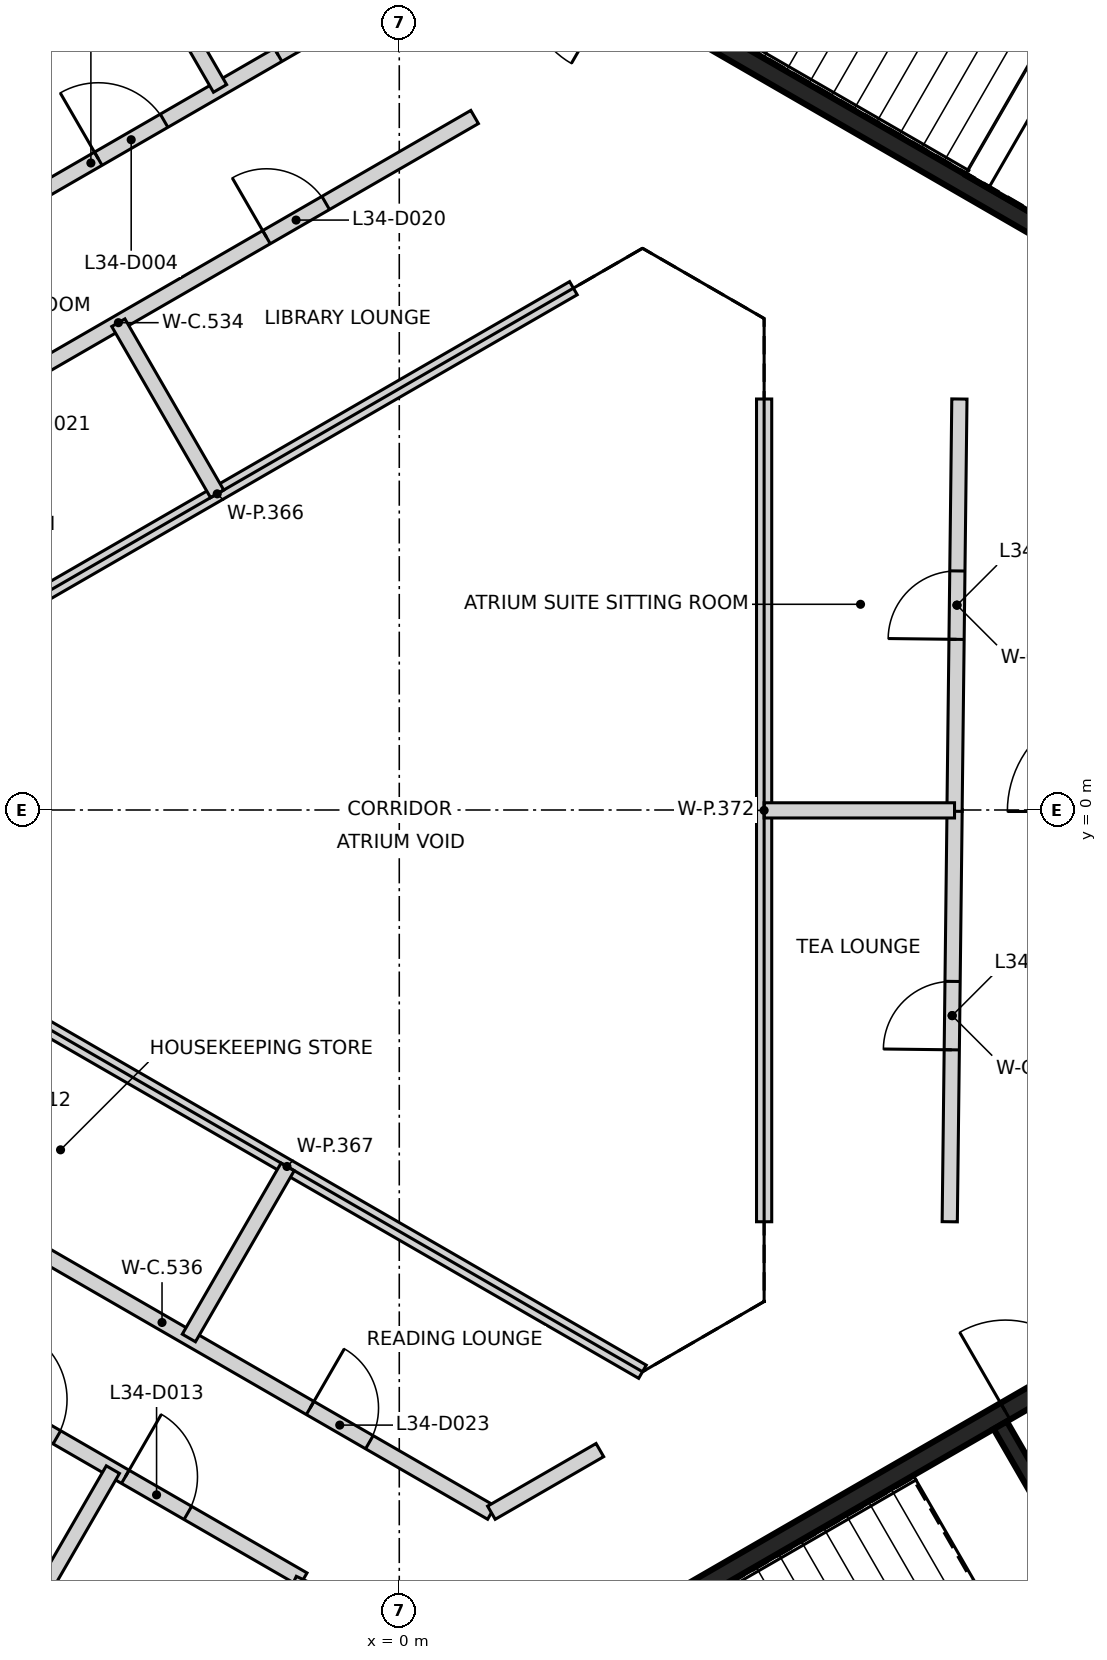
"""IFC4 building model, lengths in metres.
Left out: names, types, materials, properties, quantities, classifications, styles, units other than length and angle.
Written with IfcOpenShell. Run it as: python <this file> out.ifc"""

import sys

from ifc_helpers import new_model, si_unit, direction, frame, frame_2d, origin, place, context, subcontext, project, spatial, rectangle, extrude, element, fill, save


model = new_model("IFC4")
c1 = context("Model", 3, precision=1e-05, world=origin(), true_north=direction((0.0, 1.0)))
c2 = subcontext(c1, "Body", "Model", "MODEL_VIEW")
j1 = project(units=[si_unit("LENGTHUNIT", "METRE"), si_unit("PLANEANGLEUNIT", "RADIAN")], contexts=[c1])
p1 = place(None, origin())
s1 = spatial("IfcSite", under=j1, at=p1, CompositionType="ELEMENT")
p2 = place(p1, origin())
s2 = spatial("IfcBuilding", under=s1, at=p2, CompositionType="ELEMENT")
p3 = place(p2, frame((0.0, 0.0, 139.6)))
s3 = spatial("IfcBuildingStorey", under=s2, at=p3, CompositionType="ELEMENT", Elevation=139.6)
p4 = place(p3, frame((10.42, 6.498, 0.0), z_axis=(0.0, 0.0, 1.0), x_axis=(-0.866021906294, 0.500006057782, 0.0)))
e1 = element("IfcWall", 1, at=p4, inside=s3, PredefinedType="SHEAR", context=c2, shape_type="SweptSolid", body=[
    extrude(rectangle(XDim=11.55, YDim=0.25, at=frame_2d((5.775, 0.0))), origin(), (0.0, 0.0, 1.0), 3.2),
])
p5 = place(p4, frame((10.025, 0.0, 0.0)))
e2 = element("IfcOpeningElement", 2, at=p5, cuts=e1, PredefinedType="OPENING", context=c2, shape_type="SweptSolid", body=[
    extrude(rectangle(XDim=1.2, YDim=2.1, at=frame_2d((0.6, 1.05))), frame((0.0, 0.135, 0.0), z_axis=(0.0, -1.0, 0.0), x_axis=(1.0, 0.0, 0.0)), (0.0, 0.0, 1.0), 0.27),
])
p6 = place(p4, frame((8.725, 0.0, 0.0)))
e3 = element("IfcOpeningElement", 3, at=p6, cuts=e1, PredefinedType="OPENING", context=c2, shape_type="SweptSolid", body=[
    extrude(rectangle(XDim=1.2, YDim=2.1, at=frame_2d((0.6, 1.05))), frame((0.0, 0.135, 0.0), z_axis=(0.0, -1.0, 0.0), x_axis=(1.0, 0.0, 0.0)), (0.0, 0.0, 1.0), 0.27),
])
p7 = place(p3, frame((0.417, -12.273, 0.0), z_axis=(0.0, 0.0, 1.0), x_axis=(0.866021906294, 0.500006057782, 0.0)))
e4 = element("IfcWall", 4, at=p7, inside=s3, PredefinedType="SHEAR", context=c2, shape_type="SweptSolid", body=[
    extrude(rectangle(XDim=11.55, YDim=0.25, at=frame_2d((5.775, 0.0))), origin(), (0.0, 0.0, 1.0), 3.2),
])
p8 = place(p7, frame((10.025, 0.0, 0.0)))
e5 = element("IfcOpeningElement", 5, at=p8, cuts=e4, PredefinedType="OPENING", context=c2, shape_type="SweptSolid", body=[
    extrude(rectangle(XDim=1.2, YDim=2.1, at=frame_2d((0.6, 1.05))), frame((0.0, 0.135, 0.0), z_axis=(0.0, -1.0, 0.0), x_axis=(1.0, 0.0, 0.0)), (0.0, 0.0, 1.0), 0.27),
])
p9 = place(p7, frame((8.725, 0.0, 0.0)))
e6 = element("IfcOpeningElement", 6, at=p9, cuts=e4, PredefinedType="OPENING", context=c2, shape_type="SweptSolid", body=[
    extrude(rectangle(XDim=1.2, YDim=2.1, at=frame_2d((0.6, 1.05))), frame((0.0, 0.135, 0.0), z_axis=(0.0, -1.0, 0.0), x_axis=(1.0, 0.0, 0.0)), (0.0, 0.0, 1.0), 0.27),
])
p10 = place(p3, frame((7.906, -8.094, 0.0), z_axis=(0.0, 0.0, 1.0), x_axis=(0.500024287448, -0.866011380966, 0.0)))
e7 = element("IfcWall", 7, at=p10, inside=s3, PredefinedType="SHEAR", context=c2, shape_type="SweptSolid", body=[
    extrude(rectangle(XDim=5.251, YDim=0.2, at=frame_2d((2.625, 0.0))), origin(), (0.0, 0.0, 1.0), 3.2),
])
p11 = place(p10, frame((1.849, 0.0, 0.0)))
e8 = element("IfcOpeningElement", 8, at=p11, cuts=e7, PredefinedType="OPENING", context=c2, shape_type="SweptSolid", body=[
    extrude(rectangle(XDim=1.4, YDim=2.1, at=frame_2d((0.7, 1.05))), frame((0.0, 0.11, 0.0), z_axis=(0.0, -1.0, 0.0), x_axis=(1.0, 0.0, 0.0)), (0.0, 0.0, 1.0), 0.22),
])
p12 = place(p3, frame((-9.447, -5.4, 0.0), z_axis=(0.0, 0.0, 1.0), x_axis=(0.866101262146, -0.49986858644, 0.0)))
e9 = element("IfcWall", 9, at=p12, inside=s3, PredefinedType="PARTITIONING", context=c2, shape_type="SweptSolid", body=[
    extrude(rectangle(XDim=9.449, YDim=0.2, at=frame_2d((4.724, 0.0))), origin(), (0.0, 0.0, 1.0), 3.2),
])
p13 = place(p12, frame((2.718, 0.0, 0.0)))
e10 = element("IfcOpeningElement", 10, at=p13, cuts=e9, PredefinedType="OPENING", context=c2, shape_type="SweptSolid", body=[
    extrude(rectangle(XDim=0.95, YDim=2.1, at=frame_2d((0.475, 1.05))), frame((0.0, 0.11, 0.0), z_axis=(0.0, -1.0, 0.0), x_axis=(1.0, 0.0, 0.0)), (0.0, 0.0, 1.0), 0.22),
])
p14 = place(p12, frame((4.707, 0.0, 0.0)))
e11 = element("IfcOpeningElement", 11, at=p14, cuts=e9, PredefinedType="OPENING", context=c2, shape_type="SweptSolid", body=[
    extrude(rectangle(XDim=1.0, YDim=2.1, at=frame_2d((0.5, 1.05))), frame((0.0, 0.11, 0.0), z_axis=(0.0, -1.0, 0.0), x_axis=(1.0, 0.0, 0.0)), (0.0, 0.0, 1.0), 0.22),
])
p15 = place(p12, frame((6.746, 0.0, 0.0)))
e12 = element("IfcOpeningElement", 12, at=p15, cuts=e9, PredefinedType="OPENING", context=c2, shape_type="SweptSolid", body=[
    extrude(rectangle(XDim=0.95, YDim=2.1, at=frame_2d((0.475, 1.05))), frame((0.0, 0.11, 0.0), z_axis=(0.0, -1.0, 0.0), x_axis=(1.0, 0.0, 0.0)), (0.0, 0.0, 1.0), 0.22),
])
p16 = place(p3, frame((-8.382, 3.705, 0.0), z_axis=(0.0, 0.0, 1.0), x_axis=(0.866012036978, 0.500023151273, 0.0)))
e13 = element("IfcWall", 13, at=p16, inside=s3, PredefinedType="PARTITIONING", context=c2, shape_type="SweptSolid", body=[
    extrude(rectangle(XDim=10.823, YDim=0.2, at=frame_2d((5.412, 0.0))), origin(), (0.0, 0.0, 1.0), 3.2),
])
p17 = place(p16, frame((7.661, 0.0, 0.0)))
e14 = element("IfcOpeningElement", 14, at=p17, cuts=e13, PredefinedType="OPENING", context=c2, shape_type="SweptSolid", body=[
    extrude(rectangle(XDim=0.9, YDim=2.1, at=frame_2d((0.45, 1.05))), frame((0.0, 0.11, 0.0), z_axis=(0.0, -1.0, 0.0), x_axis=(1.0, 0.0, 0.0)), (0.0, 0.0, 1.0), 0.22),
])
p18 = place(p16, frame((2.261, 0.0, 0.0)))
e15 = element("IfcOpeningElement", 15, at=p18, cuts=e13, PredefinedType="OPENING", context=c2, shape_type="SweptSolid", body=[
    extrude(rectangle(XDim=0.9, YDim=2.1, at=frame_2d((0.45, 1.05))), frame((0.0, 0.11, 0.0), z_axis=(0.0, -1.0, 0.0), x_axis=(1.0, 0.0, 0.0)), (0.0, 0.0, 1.0), 0.22),
])
p19 = place(p3, frame((-8.161, 6.142, 0.0), z_axis=(0.0, 0.0, 1.0), x_axis=(0.865927304867, 0.500169873828, 0.0)))
e16 = element("IfcWall", 16, at=p19, inside=s3, PredefinedType="PARTITIONING", context=c2, shape_type="SweptSolid", body=[
    extrude(rectangle(XDim=9.478, YDim=0.2, at=frame_2d((4.739, 0.0))), origin(), (0.0, 0.0, 1.0), 3.2),
])
p20 = place(p19, frame((4.851, 0.0, 0.0)))
e17 = element("IfcOpeningElement", 17, at=p20, cuts=e16, PredefinedType="OPENING", context=c2, shape_type="SweptSolid", body=[
    extrude(rectangle(XDim=1.0, YDim=2.1, at=frame_2d((0.5, 1.05))), frame((0.0, 0.11, 0.0), z_axis=(0.0, -1.0, 0.0), x_axis=(1.0, 0.0, 0.0)), (0.0, 0.0, 1.0), 0.22),
])
p21 = place(p19, frame((7.583, 0.0, 0.0)))
e18 = element("IfcOpeningElement", 18, at=p21, cuts=e16, PredefinedType="OPENING", context=c2, shape_type="SweptSolid", body=[
    extrude(rectangle(XDim=1.0, YDim=2.1, at=frame_2d((0.5, 1.05))), frame((0.0, 0.11, 0.0), z_axis=(0.0, -1.0, 0.0), x_axis=(1.0, 0.0, 0.0)), (0.0, 0.0, 1.0), 0.22),
])
p22 = place(p3, frame((-7.455, -4.24, 0.0), z_axis=(0.0, 0.0, 1.0), x_axis=(0.866015783746, -0.500016662025, 0.0)))
e19 = element("IfcWall", 19, at=p22, inside=s3, PredefinedType="PARTITIONING", context=c2, shape_type="SweptSolid", body=[
    extrude(rectangle(XDim=10.009, YDim=0.2, at=frame_2d((5.004, 0.0))), origin(), (0.0, 0.0, 1.0), 3.2),
])
p23 = place(p22, frame((2.262, 0.0, 0.0)))
e20 = element("IfcOpeningElement", 20, at=p23, cuts=e19, PredefinedType="OPENING", context=c2, shape_type="SweptSolid", body=[
    extrude(rectangle(XDim=0.9, YDim=2.1, at=frame_2d((0.45, 1.05))), frame((0.0, 0.11, 0.0), z_axis=(0.0, -1.0, 0.0), x_axis=(1.0, 0.0, 0.0)), (0.0, 0.0, 1.0), 0.22),
])
p24 = place(p22, frame((7.254, 0.0, 0.0)))
e21 = element("IfcOpeningElement", 21, at=p24, cuts=e19, PredefinedType="OPENING", context=c2, shape_type="SweptSolid", body=[
    extrude(rectangle(XDim=0.9, YDim=2.1, at=frame_2d((0.45, 1.05))), frame((0.0, 0.11, 0.0), z_axis=(0.0, -1.0, 0.0), x_axis=(1.0, 0.0, 0.0)), (0.0, 0.0, 1.0), 0.22),
])
p25 = place(p3, frame((-2.162, -12.041, 0.0), z_axis=(0.0, 0.0, 1.0), x_axis=(0.424280226728, 0.905530943264, 0.0)))
e22 = element("IfcWall", 22, at=p25, inside=s3, PredefinedType="PARTITIONING", context=c2, shape_type="SweptSolid", body=[
    extrude(rectangle(XDim=2.117, YDim=0.2, at=frame_2d((1.059, 0.0))), origin(), (0.0, 0.0, 1.0), 3.2),
])
p26 = place(p3, frame((1.212, -9.245, 0.0), z_axis=(0.0, 0.0, 1.0), x_axis=(0.86593636949, 0.500154180222, 0.0)))
e23 = element("IfcWall", 23, at=p26, inside=s3, PredefinedType="PARTITIONING", context=c2, shape_type="SweptSolid", body=[
    extrude(rectangle(XDim=1.648, YDim=0.2, at=frame_2d((0.824, 0.0))), origin(), (0.0, 0.0, 1.0), 3.2),
])
p27 = place(p3, frame((7.242, -5.417, 0.0), z_axis=(0.0, 0.0, 1.0), x_axis=(0.01179195138, 0.999930472524, 0.0)))
e24 = element("IfcWall", 24, at=p27, inside=s3, PredefinedType="PARTITIONING", context=c2, shape_type="SweptSolid", body=[
    extrude(rectangle(XDim=5.425, YDim=0.2, at=frame_2d((2.712, 0.0))), origin(), (0.0, 0.0, 1.0), 3.2),
])
p28 = place(p27, frame((2.262, 0.0, 0.0)))
e25 = element("IfcOpeningElement", 25, at=p28, cuts=e24, PredefinedType="OPENING", context=c2, shape_type="SweptSolid", body=[
    extrude(rectangle(XDim=0.9, YDim=2.1, at=frame_2d((0.45, 1.05))), frame((0.0, 0.11, 0.0), z_axis=(0.0, -1.0, 0.0), x_axis=(1.0, 0.0, 0.0)), (0.0, 0.0, 1.0), 0.22),
])
p29 = place(p3, frame((7.305, -0.017, 0.0), z_axis=(0.0, 0.0, 1.0), x_axis=(0.01179195138, 0.999930472524, 0.0)))
e26 = element("IfcWall", 26, at=p29, inside=s3, PredefinedType="PARTITIONING", context=c2, shape_type="SweptSolid", body=[
    extrude(rectangle(XDim=5.425, YDim=0.2, at=frame_2d((2.712, 0.0))), origin(), (0.0, 0.0, 1.0), 3.2),
])
p30 = place(p29, frame((2.262, 0.0, 0.0)))
e27 = element("IfcOpeningElement", 27, at=p30, cuts=e26, PredefinedType="OPENING", context=c2, shape_type="SweptSolid", body=[
    extrude(rectangle(XDim=0.9, YDim=2.1, at=frame_2d((0.45, 1.05))), frame((0.0, 0.11, 0.0), z_axis=(0.0, -1.0, 0.0), x_axis=(1.0, 0.0, 0.0)), (0.0, 0.0, 1.0), 0.22),
])
p31 = place(p3, frame((-9.882, -19.267, 0.0), z_axis=(0.0, 0.0, 1.0), x_axis=(0.499993811829, 0.866028976497, 0.0)))
e28 = element("IfcWall", 28, at=p31, inside=s3, PredefinedType="PARTITIONING", context=c2, shape_type="SweptSolid", body=[
    extrude(rectangle(XDim=12.227, YDim=0.2, at=frame_2d((6.114, 0.0))), origin(), (0.0, 0.0, 1.0), 2.3),
])
p32 = place(p3, frame((-8.468, 20.076, 0.0), z_axis=(0.0, 0.0, 1.0), x_axis=(0.499961688474, -0.866047521824, 0.0)))
e29 = element("IfcWall", 29, at=p32, inside=s3, PredefinedType="PARTITIONING", context=c2, shape_type="SweptSolid", body=[
    extrude(rectangle(XDim=12.22, YDim=0.2, at=frame_2d((6.11, 0.0))), origin(), (0.0, 0.0, 1.0), 2.3),
])
p33 = place(p3, frame((-7.082, 1.453, 0.0), z_axis=(0.0, 0.0, 1.0), x_axis=(0.866010525116, 0.500025769724, 0.0)))
e30 = element("IfcWall", 30, at=p33, inside=s3, PredefinedType="PARTITIONING", context=c2, shape_type="SweptSolid", body=[
    extrude(rectangle(XDim=10.823, YDim=0.2, at=frame_2d((5.411, 0.0))), origin(), (0.0, 0.0, 1.0), 2.3),
])
p34 = place(p3, frame((-6.155, -1.989, 0.0), z_axis=(0.0, 0.0, 1.0), x_axis=(0.866009062299, -0.500028303215, 0.0)))
e31 = element("IfcWall", 31, at=p34, inside=s3, PredefinedType="PARTITIONING", context=c2, shape_type="SweptSolid", body=[
    extrude(rectangle(XDim=10.802, YDim=0.2, at=frame_2d((5.401, 0.0))), origin(), (0.0, 0.0, 1.0), 2.3),
])
p35 = place(p3, frame((-3.696, 6.411, 0.0), z_axis=(0.0, 0.0, 1.0), x_axis=(0.500006934395, -0.866021400173, 0.0)))
e32 = element("IfcWall", 32, at=p35, inside=s3, PredefinedType="PARTITIONING", context=c2, shape_type="SweptSolid", body=[
    extrude(rectangle(XDim=2.6, YDim=0.2, at=frame_2d((1.3, 0.0))), origin(), (0.0, 0.0, 1.0), 2.3),
])
p36 = place(p3, frame((-2.768, -6.946, 0.0), z_axis=(0.0, 0.0, 1.0), x_axis=(0.500017832597, 0.866015107885, 0.0)))
e33 = element("IfcWall", 33, at=p36, inside=s3, PredefinedType="PARTITIONING", context=c2, shape_type="SweptSolid", body=[
    extrude(rectangle(XDim=2.6, YDim=0.2, at=frame_2d((1.3, 0.0))), origin(), (0.0, 0.0, 1.0), 2.3),
])
p37 = place(p3, frame((4.8, -5.417, 0.0), z_axis=(0.0, 0.0, 1.0), x_axis=(0.0, 1.0, 0.0)))
e34 = element("IfcWall", 34, at=p37, inside=s3, PredefinedType="PARTITIONING", context=c2, shape_type="SweptSolid", body=[
    extrude(rectangle(XDim=10.824, YDim=0.2, at=frame_2d((5.412, 0.0))), origin(), (0.0, 0.0, 1.0), 2.3),
])
p38 = place(p3, frame((4.8, -0.005, 0.0), z_axis=(0.0, 0.0, 1.0), x_axis=(1.0, 0.0, 0.0)))
e35 = element("IfcWall", 35, at=p38, inside=s3, PredefinedType="PARTITIONING", context=c2, shape_type="SweptSolid", body=[
    extrude(rectangle(XDim=2.505, YDim=0.2, at=frame_2d((1.252, 0.0))), origin(), (0.0, 0.0, 1.0), 2.3),
])
p39 = place(p9, origin())
e36 = element("IfcDoor", 36, at=p39, inside=s3, OperationType="SINGLE_SWING_RIGHT", PredefinedType="DOOR", context=c2, shape_type="SweptSolid", body=[
    extrude(rectangle(XDim=1.2, YDim=2.1, at=frame_2d((0.6, 1.05))), frame((0.0, 0.025, 0.0), z_axis=(0.0, -1.0, 0.0), x_axis=(1.0, 0.0, 0.0)), (0.0, 0.0, 1.0), 0.05),
])
fill(e6, e36)
p40 = place(p20, origin())
e37 = element("IfcDoor", 37, at=p40, inside=s3, OperationType="SINGLE_SWING_LEFT", PredefinedType="DOOR", context=c2, shape_type="SweptSolid", body=[
    extrude(rectangle(XDim=1.0, YDim=2.1, at=frame_2d((0.5, 1.05))), frame((0.0, 0.025, 0.0), z_axis=(0.0, -1.0, 0.0), x_axis=(1.0, 0.0, 0.0)), (0.0, 0.0, 1.0), 0.05),
])
fill(e17, e37)
p41 = place(p21, origin())
e38 = element("IfcDoor", 38, at=p41, inside=s3, OperationType="SINGLE_SWING_LEFT", PredefinedType="DOOR", context=c2, shape_type="SweptSolid", body=[
    extrude(rectangle(XDim=1.0, YDim=2.1, at=frame_2d((0.5, 1.05))), frame((0.0, 0.025, 0.0), z_axis=(0.0, -1.0, 0.0), x_axis=(1.0, 0.0, 0.0)), (0.0, 0.0, 1.0), 0.05),
])
fill(e18, e38)
p42 = place(p14, frame((1.0, 0.0, 0.0), z_axis=(0.0, 0.0, 1.0), x_axis=(-1.0, 0.0, 0.0)))
e39 = element("IfcDoor", 39, at=p42, inside=s3, OperationType="SINGLE_SWING_LEFT", PredefinedType="DOOR", context=c2, shape_type="SweptSolid", body=[
    extrude(rectangle(XDim=1.0, YDim=2.1, at=frame_2d((0.5, 1.05))), frame((0.0, 0.025, 0.0), z_axis=(0.0, -1.0, 0.0), x_axis=(1.0, 0.0, 0.0)), (0.0, 0.0, 1.0), 0.05),
])
fill(e11, e39)
p43 = place(p15, frame((0.95, 0.0, 0.0), z_axis=(0.0, 0.0, 1.0), x_axis=(-1.0, 0.0, 0.0)))
e40 = element("IfcDoor", 40, at=p43, inside=s3, OperationType="SINGLE_SWING_LEFT", PredefinedType="DOOR", context=c2, shape_type="SweptSolid", body=[
    extrude(rectangle(XDim=0.95, YDim=2.1, at=frame_2d((0.475, 1.05))), frame((0.0, 0.025, 0.0), z_axis=(0.0, -1.0, 0.0), x_axis=(1.0, 0.0, 0.0)), (0.0, 0.0, 1.0), 0.05),
])
fill(e12, e40)
p44 = place(p28, origin())
e41 = element("IfcDoor", 41, at=p44, inside=s3, OperationType="SINGLE_SWING_LEFT", PredefinedType="DOOR", context=c2, shape_type="SweptSolid", body=[
    extrude(rectangle(XDim=0.9, YDim=2.1, at=frame_2d((0.45, 1.05))), frame((0.0, 0.025, 0.0), z_axis=(0.0, -1.0, 0.0), x_axis=(1.0, 0.0, 0.0)), (0.0, 0.0, 1.0), 0.05),
])
fill(e25, e41)
p45 = place(p30, origin())
e42 = element("IfcDoor", 42, at=p45, inside=s3, OperationType="SINGLE_SWING_LEFT", PredefinedType="DOOR", context=c2, shape_type="SweptSolid", body=[
    extrude(rectangle(XDim=0.9, YDim=2.1, at=frame_2d((0.45, 1.05))), frame((0.0, 0.025, 0.0), z_axis=(0.0, -1.0, 0.0), x_axis=(1.0, 0.0, 0.0)), (0.0, 0.0, 1.0), 0.05),
])
fill(e27, e42)
p46 = place(p17, frame((0.9, 0.0, 0.0), z_axis=(0.0, 0.0, 1.0), x_axis=(-1.0, 0.0, 0.0)))
e43 = element("IfcDoor", 43, at=p46, inside=s3, OperationType="SINGLE_SWING_LEFT", PredefinedType="DOOR", context=c2, shape_type="SweptSolid", body=[
    extrude(rectangle(XDim=0.9, YDim=2.1, at=frame_2d((0.45, 1.05))), frame((0.0, 0.025, 0.0), z_axis=(0.0, -1.0, 0.0), x_axis=(1.0, 0.0, 0.0)), (0.0, 0.0, 1.0), 0.05),
])
fill(e14, e43)
p47 = place(p24, origin())
e44 = element("IfcDoor", 44, at=p47, inside=s3, OperationType="SINGLE_SWING_LEFT", PredefinedType="DOOR", context=c2, shape_type="SweptSolid", body=[
    extrude(rectangle(XDim=0.9, YDim=2.1, at=frame_2d((0.45, 1.05))), frame((0.0, 0.025, 0.0), z_axis=(0.0, -1.0, 0.0), x_axis=(1.0, 0.0, 0.0)), (0.0, 0.0, 1.0), 0.05),
])
fill(e21, e44)
save(model, sys.argv[1])
